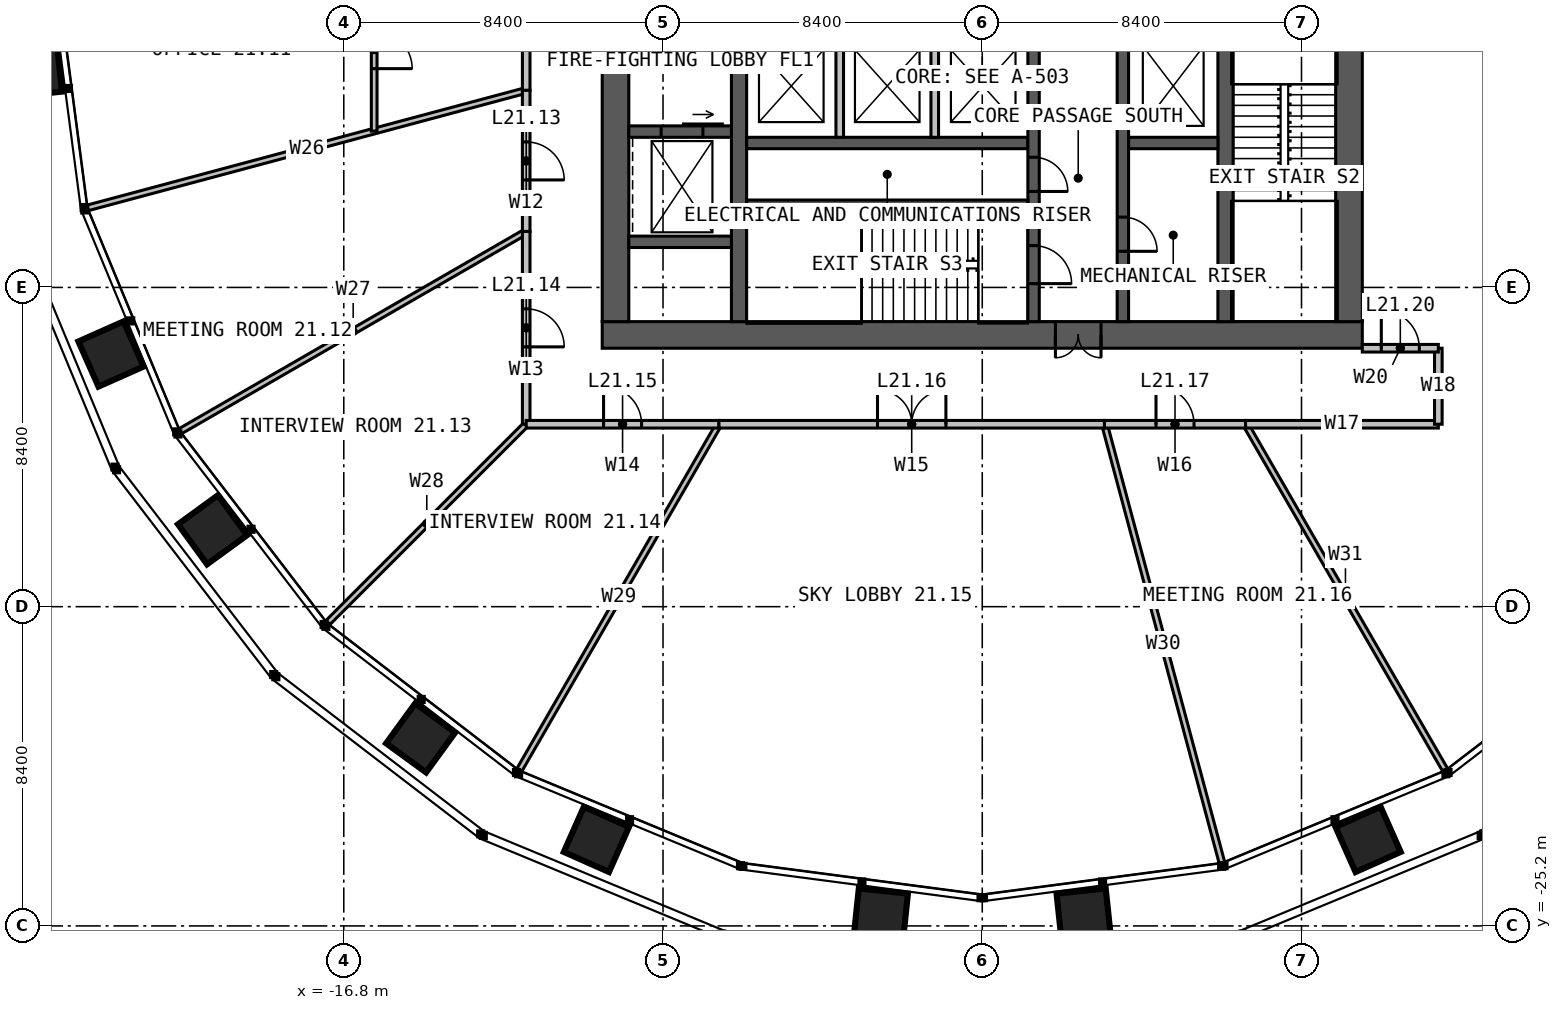
"""IFC4 building model, lengths in metres.
Left out: names, types, materials, properties, quantities, classifications, styles, units other than length and angle.
Written with IfcOpenShell. Run it as: python <this file> out.ifc"""

import sys

from ifc_helpers import new_model, si_unit, direction, frame, frame_2d, origin, place, context, subcontext, project, spatial, rectangle, extrude, element, fill, save


model = new_model("IFC4")
c1 = context("Model", 3, precision=1e-05, world=origin(), true_north=direction((0.0, 1.0)))
c2 = subcontext(c1, "Body", "Model", "MODEL_VIEW")
j1 = project(units=[si_unit("LENGTHUNIT", "METRE"), si_unit("PLANEANGLEUNIT", "RADIAN")], contexts=[c1])
p1 = place(None, origin())
s1 = spatial("IfcSite", under=j1, at=p1, CompositionType="ELEMENT")
p2 = place(p1, origin())
s2 = spatial("IfcBuilding", under=s1, at=p2, CompositionType="ELEMENT")
p3 = place(p2, frame((0.0, 0.0, 90.0)))
s3 = spatial("IfcBuildingStorey", under=s2, at=p3, CompositionType="ELEMENT", Elevation=90.0)
p4 = place(p3, frame((10.0, -9.65, 0.0), z_axis=(0.0, 0.0, 1.0), x_axis=(-1.0, 0.0, 0.0)))
e1 = element("IfcWall", 1, at=p4, inside=s3, PredefinedType="SOLIDWALL", context=c2, shape_type="SweptSolid", body=[
    extrude(rectangle(XDim=20.0, YDim=0.7, at=frame_2d((10.0, 0.0))), origin(), (0.0, 0.0, 1.0), 4.0),
])
p5 = place(p4, frame((6.875, 0.0, 0.0)))
e2 = element("IfcOpeningElement", 2, at=p5, cuts=e1, PredefinedType="OPENING", context=c2, shape_type="SweptSolid", body=[
    extrude(rectangle(XDim=1.2, YDim=2.2, at=frame_2d((0.6, 1.1))), frame((0.0, 0.36, 0.0), z_axis=(0.0, -1.0, 0.0), x_axis=(1.0, 0.0, 0.0)), (0.0, 0.0, 1.0), 0.72),
])
for number, where, z_axis, x_axis in (
    (3, (9.65, -9.3, 0.0), (0.0, 0.0, 1.0), (0.0, 1.0, 0.0)),
    (4, (-9.65, 9.3, 0.0), (0.0, 0.0, 1.0), (0.0, -1.0, 0.0)),
):
    element("IfcWall", number, at=place(p3, frame(where, z_axis=z_axis, x_axis=x_axis)), inside=s3, PredefinedType="SOLIDWALL", context=c2, shape_type="SweptSolid", body=[
        extrude(rectangle(XDim=18.6, YDim=0.7, at=frame_2d((9.3, 0.0))), origin(), (0.0, 0.0, 1.0), 4.0),
    ])
p6 = place(p3, frame((-6.4, -9.3, 0.0), z_axis=(0.0, 0.0, 1.0), x_axis=(0.0, 1.0, 0.0)))
e5 = element("IfcWall", 5, at=p6, inside=s3, PredefinedType="SOLIDWALL", context=c2, shape_type="SweptSolid", body=[
    extrude(rectangle(XDim=18.6, YDim=0.4, at=frame_2d((9.3, 0.0))), origin(), (0.0, 0.0, 1.0), 4.0),
])
p7 = place(p6, frame((8.8, 0.0, 0.0)))
e6 = element("IfcOpeningElement", 6, at=p7, cuts=e5, PredefinedType="OPENING", context=c2, shape_type="SweptSolid", body=[
    extrude(rectangle(XDim=1.0, YDim=2.2, at=frame_2d((0.5, 1.1))), frame((0.0, 0.21, 0.0), z_axis=(0.0, -1.0, 0.0), x_axis=(1.0, 0.0, 0.0)), (0.0, 0.0, 1.0), 0.42),
])
p8 = place(p3, frame((6.4, 9.3, 0.0), z_axis=(0.0, 0.0, 1.0), x_axis=(0.0, -1.0, 0.0)))
e7 = element("IfcWall", 7, at=p8, inside=s3, PredefinedType="SOLIDWALL", context=c2, shape_type="SweptSolid", body=[
    extrude(rectangle(XDim=18.6, YDim=0.4, at=frame_2d((9.3, 0.0))), origin(), (0.0, 0.0, 1.0), 4.0),
])
p9 = place(p8, frame((8.8, 0.0, 0.0)))
e8 = element("IfcOpeningElement", 8, at=p9, cuts=e7, PredefinedType="OPENING", context=c2, shape_type="SweptSolid", body=[
    extrude(rectangle(XDim=1.0, YDim=2.2, at=frame_2d((0.5, 1.1))), frame((0.0, 0.21, 0.0), z_axis=(0.0, -1.0, 0.0), x_axis=(1.0, 0.0, 0.0)), (0.0, 0.0, 1.0), 0.42),
])
p10 = place(p3, frame((-6.2, -4.6, 0.0), z_axis=(0.0, 0.0, 1.0), x_axis=(1.0, 0.0, 0.0)))
e9 = element("IfcWall", 9, at=p10, inside=s3, PredefinedType="SOLIDWALL", context=c2, shape_type="SweptSolid", body=[
    extrude(rectangle(XDim=7.4, YDim=0.3, at=frame_2d((3.7, 0.0))), origin(), (0.0, 0.0, 1.0), 4.0),
])
p11 = place(p3, frame((3.85, -4.6, 0.0), z_axis=(0.0, 0.0, 1.0), x_axis=(1.0, 0.0, 0.0)))
e10 = element("IfcWall", 10, at=p11, inside=s3, PredefinedType="SOLIDWALL", context=c2, shape_type="SweptSolid", body=[
    extrude(rectangle(XDim=2.35, YDim=0.3, at=frame_2d((1.175, 0.0))), origin(), (0.0, 0.0, 1.0), 4.0),
])
p12 = place(p3, frame((1.35, -1.45, 0.0), z_axis=(0.0, 0.0, 1.0), x_axis=(0.0, -1.0, 0.0)))
e11 = element("IfcWall", 11, at=p12, inside=s3, PredefinedType="SOLIDWALL", context=c2, shape_type="SweptSolid", body=[
    extrude(rectangle(XDim=7.85, YDim=0.3, at=frame_2d((3.925, 0.0))), origin(), (0.0, 0.0, 1.0), 4.0),
])
p13 = place(p12, frame((5.85, 0.0, 0.0)))
e12 = element("IfcOpeningElement", 12, at=p13, cuts=e11, PredefinedType="OPENING", context=c2, shape_type="SweptSolid", body=[
    extrude(rectangle(XDim=1.0, YDim=2.2, at=frame_2d((0.5, 1.1))), frame((0.0, 0.16, 0.0), z_axis=(0.0, -1.0, 0.0), x_axis=(1.0, 0.0, 0.0)), (0.0, 0.0, 1.0), 0.32),
])
p14 = place(p12, frame((3.525, 0.0, 0.0)))
e13 = element("IfcOpeningElement", 13, at=p14, cuts=e11, PredefinedType="OPENING", context=c2, shape_type="SweptSolid", body=[
    extrude(rectangle(XDim=0.9, YDim=2.2, at=frame_2d((0.45, 1.1))), frame((0.0, 0.16, 0.0), z_axis=(0.0, -1.0, 0.0), x_axis=(1.0, 0.0, 0.0)), (0.0, 0.0, 1.0), 0.32),
])
p15 = place(p3, frame((3.7, -1.45, 0.0), z_axis=(0.0, 0.0, 1.0), x_axis=(0.0, -1.0, 0.0)))
e14 = element("IfcWall", 14, at=p15, inside=s3, PredefinedType="SOLIDWALL", context=c2, shape_type="SweptSolid", body=[
    extrude(rectangle(XDim=7.85, YDim=0.3, at=frame_2d((3.925, 0.0))), origin(), (0.0, 0.0, 1.0), 4.0),
])
p16 = place(p15, frame((5.1, 0.0, 0.0)))
e15 = element("IfcOpeningElement", 15, at=p16, cuts=e14, PredefinedType="OPENING", context=c2, shape_type="SweptSolid", body=[
    extrude(rectangle(XDim=0.9, YDim=2.2, at=frame_2d((0.45, 1.1))), frame((0.0, 0.16, 0.0), z_axis=(0.0, -1.0, 0.0), x_axis=(1.0, 0.0, 0.0)), (0.0, 0.0, 1.0), 0.32),
])
p17 = place(p3, frame((-6.2, -6.2, 0.0), z_axis=(0.0, 0.0, 1.0), x_axis=(1.0, 0.0, 0.0)))
e16 = element("IfcWall", 16, at=p17, inside=s3, PredefinedType="SOLIDWALL", context=c2, shape_type="SweptSolid", body=[
    extrude(rectangle(XDim=7.4, YDim=0.2, at=frame_2d((3.7, 0.0))), origin(), (0.0, 0.0, 1.0), 4.0),
])
p18 = place(p3, frame((-9.3, -4.3, 0.0), z_axis=(0.0, 0.0, 1.0), x_axis=(1.0, 0.0, 0.0)))
e17 = element("IfcWall", 17, at=p18, inside=s3, PredefinedType="SOLIDWALL", context=c2, shape_type="SweptSolid", body=[
    extrude(rectangle(XDim=2.7, YDim=0.3, at=frame_2d((1.35, 0.0))), origin(), (0.0, 0.0, 1.0), 4.0),
])
p19 = place(p18, frame((0.85, 0.0, 0.0)))
e18 = element("IfcOpeningElement", 18, at=p19, cuts=e17, PredefinedType="OPENING", context=c2, shape_type="SweptSolid", body=[
    extrude(rectangle(XDim=1.1, YDim=2.2, at=frame_2d((0.55, 1.1))), frame((0.0, 0.16, 0.0), z_axis=(0.0, -1.0, 0.0), x_axis=(1.0, 0.0, 0.0)), (0.0, 0.0, 1.0), 0.32),
])
p20 = place(p3, frame((-9.3, -7.2, 0.0), z_axis=(0.0, 0.0, 1.0), x_axis=(1.0, 0.0, 0.0)))
e19 = element("IfcWall", 19, at=p20, inside=s3, PredefinedType="SOLIDWALL", context=c2, shape_type="SweptSolid", body=[
    extrude(rectangle(XDim=2.7, YDim=0.3, at=frame_2d((1.35, 0.0))), origin(), (0.0, 0.0, 1.0), 4.0),
])
for number, where, z_axis, x_axis in (
    (20, (-3.75, -1.75, 0.0), (0.0, 0.0, 1.0), (0.0, -1.0, 0.0)),
    (21, (-1.25, -1.75, 0.0), (0.0, 0.0, 1.0), (0.0, -1.0, 0.0)),
):
    element("IfcWall", number, at=place(p3, frame(where, z_axis=z_axis, x_axis=x_axis)), inside=s3, PredefinedType="SOLIDWALL", context=c2, shape_type="SweptSolid", body=[
        extrude(rectangle(XDim=2.7, YDim=0.2, at=frame_2d((1.35, 0.0))), origin(), (0.0, 0.0, 1.0), 3.75),
    ])
p21 = place(p3, frame((-12.0, -3.215, 0.0), z_axis=(0.0, 0.0, 1.0), x_axis=(-0.965926615498, -0.258816099716, 0.0)))
e22 = element("IfcWall", 22, at=p21, inside=s3, PredefinedType="PARTITIONING", context=c2, shape_type="SweptSolid", body=[
    extrude(rectangle(XDim=11.947, YDim=0.15, at=frame_2d((5.973, 0.0))), origin(), (0.0, 0.0, 1.0), 2.89),
])
p22 = place(p3, frame((-12.0, -6.928, 0.0), z_axis=(0.0, 0.0, 1.0), x_axis=(-0.866028201971, -0.499995153367, 0.0)))
e23 = element("IfcWall", 23, at=p22, inside=s3, PredefinedType="PARTITIONING", context=c2, shape_type="SweptSolid", body=[
    extrude(rectangle(XDim=10.514, YDim=0.15, at=frame_2d((5.257, 0.0))), origin(), (0.0, 0.0, 1.0), 2.89),
])
p23 = place(p3, frame((-12.0, -12.0, 0.0), z_axis=(0.0, 0.0, 1.0), x_axis=(-0.707106781187, -0.707106781187, 0.0)))
e24 = element("IfcWall", 24, at=p23, inside=s3, PredefinedType="PARTITIONING", context=c2, shape_type="SweptSolid", body=[
    extrude(rectangle(XDim=7.4, YDim=0.15, at=frame_2d((3.7, 0.0))), origin(), (0.0, 0.0, 1.0), 2.89),
])
p24 = place(p3, frame((-6.928, -12.0, 0.0), z_axis=(0.0, 0.0, 1.0), x_axis=(-0.499995153367, -0.866028201971, 0.0)))
e25 = element("IfcWall", 25, at=p24, inside=s3, PredefinedType="PARTITIONING", context=c2, shape_type="SweptSolid", body=[
    extrude(rectangle(XDim=10.514, YDim=0.15, at=frame_2d((5.257, 0.0))), origin(), (0.0, 0.0, 1.0), 2.89),
])
p25 = place(p3, frame((3.215, -12.0, 0.0), z_axis=(0.0, 0.0, 1.0), x_axis=(0.258816099716, -0.965926615498, 0.0)))
e26 = element("IfcWall", 26, at=p25, inside=s3, PredefinedType="PARTITIONING", context=c2, shape_type="SweptSolid", body=[
    extrude(rectangle(XDim=11.947, YDim=0.15, at=frame_2d((5.973, 0.0))), origin(), (0.0, 0.0, 1.0), 2.89),
])
p26 = place(p3, frame((6.928, -12.0, 0.0), z_axis=(0.0, 0.0, 1.0), x_axis=(0.499995153367, -0.866028201971, 0.0)))
e27 = element("IfcWall", 27, at=p26, inside=s3, PredefinedType="PARTITIONING", context=c2, shape_type="SweptSolid", body=[
    extrude(rectangle(XDim=10.514, YDim=0.15, at=frame_2d((5.257, 0.0))), origin(), (0.0, 0.0, 1.0), 2.89),
])
p27 = place(p3, frame((-16.0, 9.238, 0.0), z_axis=(0.0, 0.0, 1.0), x_axis=(0.0, -1.0, 0.0)))
e28 = element("IfcWall", 28, at=p27, inside=s3, PredefinedType="PARTITIONING", context=c2, shape_type="SweptSolid", body=[
    extrude(rectangle(XDim=13.525, YDim=0.15, at=frame_2d((6.762, 0.0))), origin(), (0.0, 0.0, 1.0), 2.89),
])
p28 = place(p27, frame((0.805, 0.0, 0.0)))
e29 = element("IfcOpeningElement", 29, at=p28, cuts=e28, PredefinedType="OPENING", context=c2, shape_type="SweptSolid", body=[
    extrude(rectangle(XDim=1.0, YDim=2.2, at=frame_2d((0.5, 1.1))), frame((0.0, 0.085, 0.0), z_axis=(0.0, -1.0, 0.0), x_axis=(1.0, 0.0, 0.0)), (0.0, 0.0, 1.0), 0.17),
])
p29 = place(p27, frame((5.424, 0.0, 0.0)))
e30 = element("IfcOpeningElement", 30, at=p29, cuts=e28, PredefinedType="OPENING", context=c2, shape_type="SweptSolid", body=[
    extrude(rectangle(XDim=1.0, YDim=2.2, at=frame_2d((0.5, 1.1))), frame((0.0, 0.085, 0.0), z_axis=(0.0, -1.0, 0.0), x_axis=(1.0, 0.0, 0.0)), (0.0, 0.0, 1.0), 0.17),
])
p30 = place(p27, frame((10.881, 0.0, 0.0)))
e31 = element("IfcOpeningElement", 31, at=p30, cuts=e28, PredefinedType="OPENING", context=c2, shape_type="SweptSolid", body=[
    extrude(rectangle(XDim=1.0, YDim=2.2, at=frame_2d((0.5, 1.1))), frame((0.0, 0.085, 0.0), z_axis=(0.0, -1.0, 0.0), x_axis=(1.0, 0.0, 0.0)), (0.0, 0.0, 1.0), 0.17),
])
p31 = place(p3, frame((-12.0, 6.928, 0.0), z_axis=(0.0, 0.0, 1.0), x_axis=(0.0, -1.0, 0.0)))
e32 = element("IfcWall", 32, at=p31, inside=s3, PredefinedType="PARTITIONING", context=c2, shape_type="SweptSolid", body=[
    extrude(rectangle(XDim=10.144, YDim=0.2, at=frame_2d((5.072, 0.0))), origin(), (0.0, 0.0, 1.0), 3.8),
])
p32 = place(p31, frame((4.172, 0.0, 0.0)))
e33 = element("IfcOpeningElement", 33, at=p32, cuts=e32, PredefinedType="OPENING", context=c2, shape_type="SweptSolid", body=[
    extrude(rectangle(XDim=1.8, YDim=2.2, at=frame_2d((0.9, 1.1))), frame((0.0, 0.11, 0.0), z_axis=(0.0, -1.0, 0.0), x_axis=(1.0, 0.0, 0.0)), (0.0, 0.0, 1.0), 0.22),
])
p33 = place(p3, frame((-12.0, -3.215, 0.0), z_axis=(0.0, 0.0, 1.0), x_axis=(0.0, -1.0, 0.0)))
e34 = element("IfcWall", 34, at=p33, inside=s3, PredefinedType="PARTITIONING", context=c2, shape_type="SweptSolid", body=[
    extrude(rectangle(XDim=3.713, YDim=0.2, at=frame_2d((1.856, 0.0))), origin(), (0.0, 0.0, 1.0), 3.8),
])
p34 = place(p33, frame((1.356, 0.0, 0.0)))
e35 = element("IfcOpeningElement", 35, at=p34, cuts=e34, PredefinedType="OPENING", context=c2, shape_type="SweptSolid", body=[
    extrude(rectangle(XDim=1.0, YDim=2.2, at=frame_2d((0.5, 1.1))), frame((0.0, 0.11, 0.0), z_axis=(0.0, -1.0, 0.0), x_axis=(1.0, 0.0, 0.0)), (0.0, 0.0, 1.0), 0.22),
])
p35 = place(p3, frame((-12.0, -6.928, 0.0), z_axis=(0.0, 0.0, 1.0), x_axis=(0.0, -1.0, 0.0)))
e36 = element("IfcWall", 36, at=p35, inside=s3, PredefinedType="PARTITIONING", context=c2, shape_type="SweptSolid", body=[
    extrude(rectangle(XDim=5.072, YDim=0.2, at=frame_2d((2.536, 0.0))), origin(), (0.0, 0.0, 1.0), 3.8),
])
p36 = place(p35, frame((2.036, 0.0, 0.0)))
e37 = element("IfcOpeningElement", 37, at=p36, cuts=e36, PredefinedType="OPENING", context=c2, shape_type="SweptSolid", body=[
    extrude(rectangle(XDim=1.0, YDim=2.2, at=frame_2d((0.5, 1.1))), frame((0.0, 0.11, 0.0), z_axis=(0.0, -1.0, 0.0), x_axis=(1.0, 0.0, 0.0)), (0.0, 0.0, 1.0), 0.22),
])
p37 = place(p3, frame((-12.0, -12.0, 0.0), z_axis=(0.0, 0.0, 1.0), x_axis=(1.0, 0.0, 0.0)))
e38 = element("IfcWall", 38, at=p37, inside=s3, PredefinedType="PARTITIONING", context=c2, shape_type="SweptSolid", body=[
    extrude(rectangle(XDim=5.072, YDim=0.2, at=frame_2d((2.536, 0.0))), origin(), (0.0, 0.0, 1.0), 3.8),
])
p38 = place(p37, frame((2.036, 0.0, 0.0)))
e39 = element("IfcOpeningElement", 39, at=p38, cuts=e38, PredefinedType="OPENING", context=c2, shape_type="SweptSolid", body=[
    extrude(rectangle(XDim=1.0, YDim=2.2, at=frame_2d((0.5, 1.1))), frame((0.0, 0.11, 0.0), z_axis=(0.0, -1.0, 0.0), x_axis=(1.0, 0.0, 0.0)), (0.0, 0.0, 1.0), 0.22),
])
p39 = place(p3, frame((-6.928, -12.0, 0.0), z_axis=(0.0, 0.0, 1.0), x_axis=(1.0, 0.0, 0.0)))
e40 = element("IfcWall", 40, at=p39, inside=s3, PredefinedType="PARTITIONING", context=c2, shape_type="SweptSolid", body=[
    extrude(rectangle(XDim=10.144, YDim=0.2, at=frame_2d((5.072, 0.0))), origin(), (0.0, 0.0, 1.0), 3.8),
])
p40 = place(p39, frame((4.172, 0.0, 0.0)))
e41 = element("IfcOpeningElement", 41, at=p40, cuts=e40, PredefinedType="OPENING", context=c2, shape_type="SweptSolid", body=[
    extrude(rectangle(XDim=1.8, YDim=2.2, at=frame_2d((0.9, 1.1))), frame((0.0, 0.11, 0.0), z_axis=(0.0, -1.0, 0.0), x_axis=(1.0, 0.0, 0.0)), (0.0, 0.0, 1.0), 0.22),
])
p41 = place(p3, frame((3.215, -12.0, 0.0), z_axis=(0.0, 0.0, 1.0), x_axis=(1.0, 0.0, 0.0)))
e42 = element("IfcWall", 42, at=p41, inside=s3, PredefinedType="PARTITIONING", context=c2, shape_type="SweptSolid", body=[
    extrude(rectangle(XDim=3.713, YDim=0.2, at=frame_2d((1.856, 0.0))), origin(), (0.0, 0.0, 1.0), 3.8),
])
p42 = place(p41, frame((1.356, 0.0, 0.0)))
e43 = element("IfcOpeningElement", 43, at=p42, cuts=e42, PredefinedType="OPENING", context=c2, shape_type="SweptSolid", body=[
    extrude(rectangle(XDim=1.0, YDim=2.2, at=frame_2d((0.5, 1.1))), frame((0.0, 0.11, 0.0), z_axis=(0.0, -1.0, 0.0), x_axis=(1.0, 0.0, 0.0)), (0.0, 0.0, 1.0), 0.22),
])
p43 = place(p3, frame((6.928, -12.0, 0.0), z_axis=(0.0, 0.0, 1.0), x_axis=(1.0, 0.0, 0.0)))
e44 = element("IfcWall", 44, at=p43, inside=s3, PredefinedType="PARTITIONING", context=c2, shape_type="SweptSolid", body=[
    extrude(rectangle(XDim=5.072, YDim=0.2, at=frame_2d((2.536, 0.0))), origin(), (0.0, 0.0, 1.0), 3.8),
])
p44 = place(p3, frame((12.0, -12.0, 0.0), z_axis=(0.0, 0.0, 1.0), x_axis=(0.0, 1.0, 0.0)))
e45 = element("IfcWall", 45, at=p44, inside=s3, PredefinedType="PARTITIONING", context=c2, shape_type="SweptSolid", body=[
    extrude(rectangle(XDim=2.0, YDim=0.2, at=frame_2d((1.0, 0.0))), origin(), (0.0, 0.0, 1.0), 3.8),
])
p45 = place(p3, frame((10.0, -10.0, 0.0), z_axis=(0.0, 0.0, 1.0), x_axis=(1.0, 0.0, 0.0)))
e46 = element("IfcWall", 46, at=p45, inside=s3, PredefinedType="PARTITIONING", context=c2, shape_type="SweptSolid", body=[
    extrude(rectangle(XDim=2.0, YDim=0.2, at=frame_2d((1.0, 0.0))), origin(), (0.0, 0.0, 1.0), 3.8),
])
p46 = place(p45, frame((0.5, 0.0, 0.0)))
e47 = element("IfcOpeningElement", 47, at=p46, cuts=e46, PredefinedType="OPENING", context=c2, shape_type="SweptSolid", body=[
    extrude(rectangle(XDim=1.0, YDim=2.2, at=frame_2d((0.5, 1.1))), frame((0.0, 0.11, 0.0), z_axis=(0.0, -1.0, 0.0), x_axis=(1.0, 0.0, 0.0)), (0.0, 0.0, 1.0), 0.22),
])
p47 = place(p5, origin())
e48 = element("IfcDoor", 48, at=p47, inside=s3, OperationType="DOUBLE_DOOR_SINGLE_SWING", PredefinedType="DOOR", context=c2, shape_type="SweptSolid", body=[
    extrude(rectangle(XDim=1.2, YDim=2.2, at=frame_2d((0.6, 1.1))), frame((0.0, 0.025, 0.0), z_axis=(0.0, -1.0, 0.0), x_axis=(1.0, 0.0, 0.0)), (0.0, 0.0, 1.0), 0.05),
])
fill(e2, e48)
p48 = place(p13, origin())
e49 = element("IfcDoor", 49, at=p48, inside=s3, OperationType="SINGLE_SWING_RIGHT", PredefinedType="DOOR", context=c2, shape_type="SweptSolid", body=[
    extrude(rectangle(XDim=1.0, YDim=2.2, at=frame_2d((0.5, 1.1))), frame((0.0, 0.025, 0.0), z_axis=(0.0, -1.0, 0.0), x_axis=(1.0, 0.0, 0.0)), (0.0, 0.0, 1.0), 0.05),
])
fill(e12, e49)
p49 = place(p14, origin())
e50 = element("IfcDoor", 50, at=p49, inside=s3, OperationType="SINGLE_SWING_RIGHT", PredefinedType="DOOR", context=c2, shape_type="SweptSolid", body=[
    extrude(rectangle(XDim=0.9, YDim=2.2, at=frame_2d((0.45, 1.1))), frame((0.0, 0.025, 0.0), z_axis=(0.0, -1.0, 0.0), x_axis=(1.0, 0.0, 0.0)), (0.0, 0.0, 1.0), 0.05),
])
fill(e13, e50)
p50 = place(p16, origin())
e51 = element("IfcDoor", 51, at=p50, inside=s3, OperationType="SINGLE_SWING_RIGHT", PredefinedType="DOOR", context=c2, shape_type="SweptSolid", body=[
    extrude(rectangle(XDim=0.9, YDim=2.2, at=frame_2d((0.45, 1.1))), frame((0.0, 0.025, 0.0), z_axis=(0.0, -1.0, 0.0), x_axis=(1.0, 0.0, 0.0)), (0.0, 0.0, 1.0), 0.05),
])
fill(e15, e51)
p51 = place(p19, origin())
e52 = element("IfcDoor", 52, at=p51, inside=s3, OperationType="SLIDING_TO_LEFT", PredefinedType="DOOR", context=c2, shape_type="SweptSolid", body=[
    extrude(rectangle(XDim=1.1, YDim=2.2, at=frame_2d((0.55, 1.1))), frame((0.0, 0.025, 0.0), z_axis=(0.0, -1.0, 0.0), x_axis=(1.0, 0.0, 0.0)), (0.0, 0.0, 1.0), 0.05),
])
fill(e18, e52)
p52 = place(p30, origin())
e53 = element("IfcDoor", 53, at=p52, inside=s3, OperationType="SINGLE_SWING_RIGHT", PredefinedType="DOOR", context=c2, shape_type="SweptSolid", body=[
    extrude(rectangle(XDim=1.0, YDim=2.2, at=frame_2d((0.5, 1.1))), frame((0.0, 0.025, 0.0), z_axis=(0.0, -1.0, 0.0), x_axis=(1.0, 0.0, 0.0)), (0.0, 0.0, 1.0), 0.05),
])
fill(e31, e53)
p53 = place(p34, origin())
e54 = element("IfcDoor", 54, at=p53, inside=s3, OperationType="SINGLE_SWING_RIGHT", PredefinedType="DOOR", context=c2, shape_type="SweptSolid", body=[
    extrude(rectangle(XDim=1.0, YDim=2.2, at=frame_2d((0.5, 1.1))), frame((0.0, 0.025, 0.0), z_axis=(0.0, -1.0, 0.0), x_axis=(1.0, 0.0, 0.0)), (0.0, 0.0, 1.0), 0.05),
])
fill(e35, e54)
p54 = place(p36, origin())
e55 = element("IfcDoor", 55, at=p54, inside=s3, OperationType="SINGLE_SWING_RIGHT", PredefinedType="DOOR", context=c2, shape_type="SweptSolid", body=[
    extrude(rectangle(XDim=1.0, YDim=2.2, at=frame_2d((0.5, 1.1))), frame((0.0, 0.025, 0.0), z_axis=(0.0, -1.0, 0.0), x_axis=(1.0, 0.0, 0.0)), (0.0, 0.0, 1.0), 0.05),
])
fill(e37, e55)
p55 = place(p38, origin())
e56 = element("IfcDoor", 56, at=p55, inside=s3, OperationType="SINGLE_SWING_LEFT", PredefinedType="DOOR", context=c2, shape_type="SweptSolid", body=[
    extrude(rectangle(XDim=1.0, YDim=2.2, at=frame_2d((0.5, 1.1))), frame((0.0, 0.025, 0.0), z_axis=(0.0, -1.0, 0.0), x_axis=(1.0, 0.0, 0.0)), (0.0, 0.0, 1.0), 0.05),
])
fill(e39, e56)
p56 = place(p40, origin())
e57 = element("IfcDoor", 57, at=p56, inside=s3, OperationType="DOUBLE_DOOR_SINGLE_SWING", PredefinedType="DOOR", context=c2, shape_type="SweptSolid", body=[
    extrude(rectangle(XDim=1.8, YDim=2.2, at=frame_2d((0.9, 1.1))), frame((0.0, 0.025, 0.0), z_axis=(0.0, -1.0, 0.0), x_axis=(1.0, 0.0, 0.0)), (0.0, 0.0, 1.0), 0.05),
])
fill(e41, e57)
p57 = place(p42, origin())
e58 = element("IfcDoor", 58, at=p57, inside=s3, OperationType="SINGLE_SWING_LEFT", PredefinedType="DOOR", context=c2, shape_type="SweptSolid", body=[
    extrude(rectangle(XDim=1.0, YDim=2.2, at=frame_2d((0.5, 1.1))), frame((0.0, 0.025, 0.0), z_axis=(0.0, -1.0, 0.0), x_axis=(1.0, 0.0, 0.0)), (0.0, 0.0, 1.0), 0.05),
])
fill(e43, e58)
p58 = place(p46, origin())
e59 = element("IfcDoor", 59, at=p58, inside=s3, OperationType="SINGLE_SWING_LEFT", PredefinedType="DOOR", context=c2, shape_type="SweptSolid", body=[
    extrude(rectangle(XDim=1.0, YDim=2.2, at=frame_2d((0.5, 1.1))), frame((0.0, 0.025, 0.0), z_axis=(0.0, -1.0, 0.0), x_axis=(1.0, 0.0, 0.0)), (0.0, 0.0, 1.0), 0.05),
])
fill(e47, e59)
save(model, sys.argv[1])
